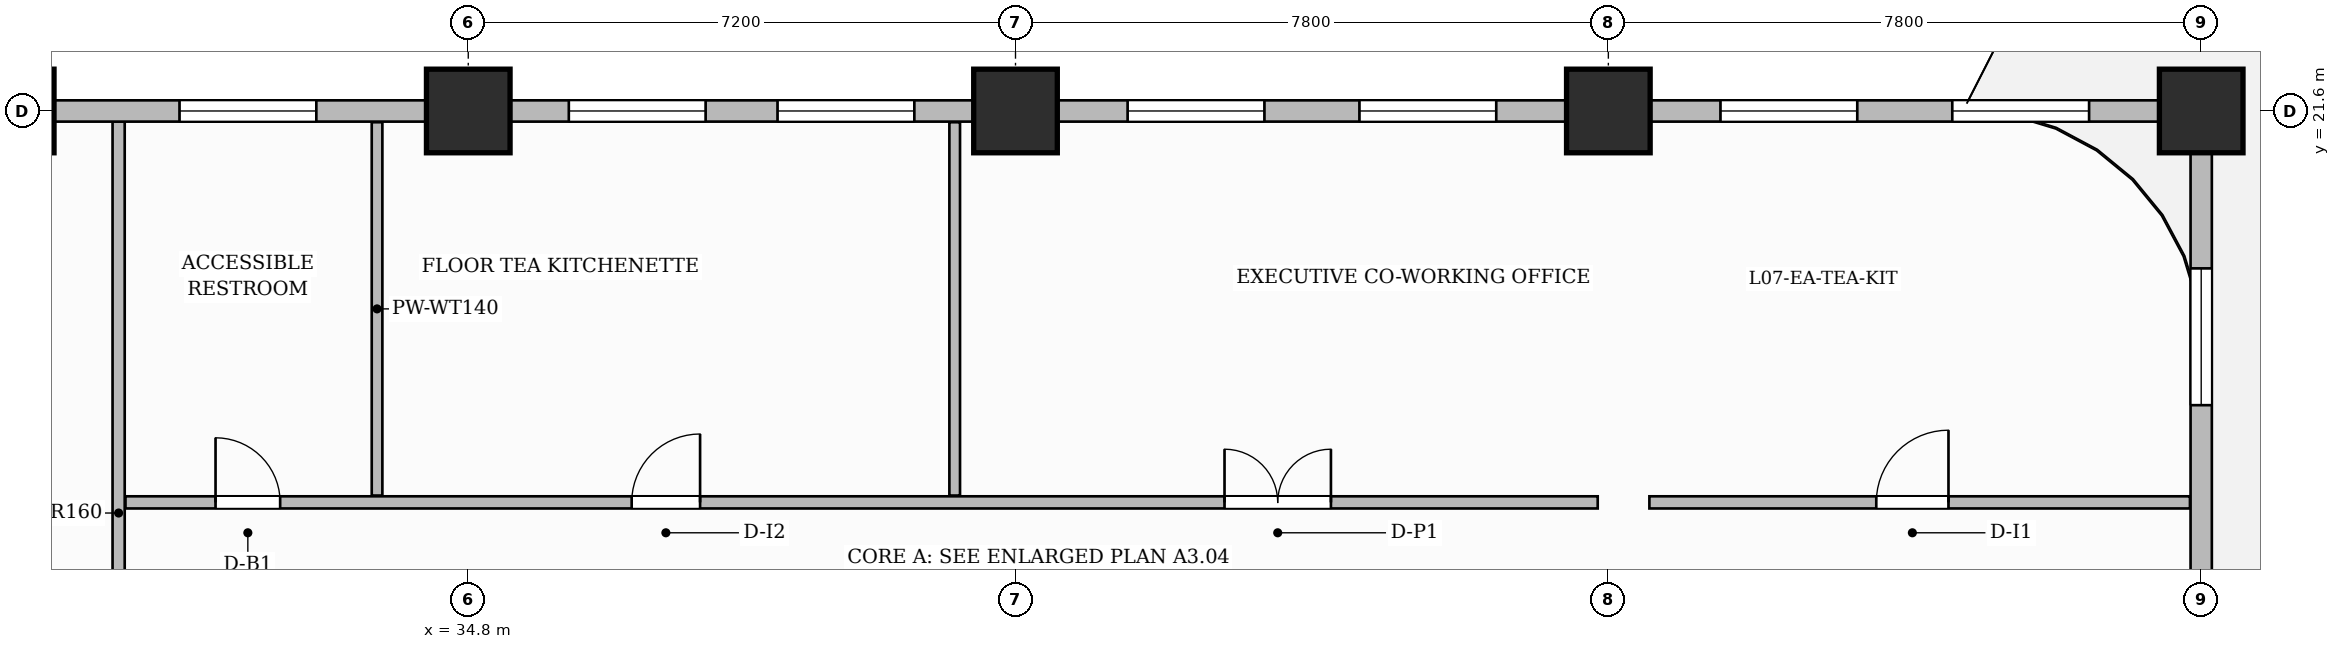
"""IFC4 building model, lengths in metres.
Left out: names, types, materials, properties, quantities, classifications, styles, units other than length and angle.
Written with IfcOpenShell. Run it as: python <this file> out.ifc"""

import sys

from ifc_helpers import new_model, si_unit, direction, frame, frame_2d, origin, origin_2d, place, context, subcontext, project, spatial, rectangle, extrude, source, transform, mapped, element, fill, save


model = new_model("IFC4")
c1 = context("Model", 3, precision=1e-05, world=origin(), true_north=direction((0.0, 1.0)))
c2 = subcontext(c1, "Body", "Model", "MODEL_VIEW")
j1 = project(units=[si_unit("LENGTHUNIT", "METRE"), si_unit("PLANEANGLEUNIT", "RADIAN")], contexts=[c1])
p1 = place(None, origin())
s1 = spatial("IfcSite", under=j1, at=p1, CompositionType="ELEMENT")
p2 = place(p1, origin())
s2 = spatial("IfcBuilding", under=s1, at=p2, CompositionType="ELEMENT")
p3 = place(p2, frame((0.0, 0.0, 36.1)))
s3 = spatial("IfcBuildingStorey", under=s2, at=p3, CompositionType="ELEMENT", Elevation=36.1)
m1 = source(origin(), c2, "Body", "SweptSolid", [
    extrude(rectangle(XDim=1.1, YDim=1.1, at=origin_2d()), origin(), (0.0, 0.0, 1.0), 3.7),
])
for number, where, z_axis, x_axis in (
    (1, (28.8, 21.6, 0.0), (0.0, 0.0, 1.0), (1.0, 0.0, 0.0)),
    (2, (34.8, 21.6, 0.0), (0.0, 0.0, 1.0), (1.0, 0.0, 0.0)),
    (3, (42.0, 21.6, 0.0), (0.0, 0.0, 1.0), (1.0, 0.0, 0.0)),
    (4, (49.8, 21.6, 0.0), (0.0, 0.0, 1.0), (1.0, 0.0, 0.0)),
    (5, (57.6, 21.6, 0.0), (0.0, 0.0, 1.0), (1.0, 0.0, 0.0)),
):
    element("IfcColumn", number, at=place(p3, frame(where, z_axis=z_axis, x_axis=x_axis)), inside=s3, PredefinedType="COLUMN", context=c2, shape_type="MappedRepresentation", body=[
        mapped(m1, transform((0.0, 0.0, 0.0), scale=1.0)),
    ])
p4 = place(p3, frame((30.2, 11.16, 0.0), z_axis=(0.0, 0.0, 1.0), x_axis=(0.0, 1.0, 0.0)))
e6 = element("IfcWall", 6, at=p4, inside=s3, PredefinedType="PARTITIONING", context=c2, shape_type="SweptSolid", body=[
    extrude(rectangle(XDim=10.3, YDim=0.16, at=frame_2d((5.15, 0.0))), origin(), (0.0, 0.0, 1.0), 3.45),
])
p5 = place(p3, frame((30.29, 16.45, 0.0), z_axis=(0.0, 0.0, 1.0), x_axis=(1.0, 0.0, 0.0)))
e7 = element("IfcWall", 7, at=p5, inside=s3, PredefinedType="PARTITIONING", context=c2, shape_type="SweptSolid", body=[
    extrude(rectangle(XDim=19.37, YDim=0.16, at=frame_2d((9.685, 0.0))), origin(), (0.0, 0.0, 1.0), 3.45),
])
p6 = place(p5, frame((1.185, 0.0, 0.0)))
e8 = element("IfcOpeningElement", 8, at=p6, cuts=e7, PredefinedType="OPENING", context=c2, shape_type="SweptSolid", body=[
    extrude(rectangle(XDim=0.85, YDim=2.1, at=frame_2d((0.425, 1.05))), frame((0.0, 0.09, 0.0), z_axis=(0.0, -1.0, 0.0), x_axis=(1.0, 0.0, 0.0)), (0.0, 0.0, 1.0), 0.18),
])
p7 = place(p5, frame((6.66, 0.0, 0.0)))
e9 = element("IfcOpeningElement", 9, at=p7, cuts=e7, PredefinedType="OPENING", context=c2, shape_type="SweptSolid", body=[
    extrude(rectangle(XDim=0.9, YDim=2.15, at=frame_2d((0.45, 1.075))), frame((0.0, 0.09, 0.0), z_axis=(0.0, -1.0, 0.0), x_axis=(1.0, 0.0, 0.0)), (0.0, 0.0, 1.0), 0.18),
])
p8 = place(p5, frame((14.46, 0.0, 0.0)))
e10 = element("IfcOpeningElement", 10, at=p8, cuts=e7, PredefinedType="OPENING", context=c2, shape_type="SweptSolid", body=[
    extrude(rectangle(XDim=1.4, YDim=2.35, at=frame_2d((0.7, 1.175))), frame((0.0, 0.09, 0.0), z_axis=(0.0, -1.0, 0.0), x_axis=(1.0, 0.0, 0.0)), (0.0, 0.0, 1.0), 0.18),
])
p9 = place(p3, frame((50.34, 16.45, 0.0), z_axis=(0.0, 0.0, 1.0), x_axis=(1.0, 0.0, 0.0)))
e11 = element("IfcWall", 11, at=p9, inside=s3, PredefinedType="PARTITIONING", context=c2, shape_type="SweptSolid", body=[
    extrude(rectangle(XDim=7.112, YDim=0.16, at=frame_2d((3.556, 0.0))), origin(), (0.0, 0.0, 1.0), 3.45),
])
p10 = place(p9, frame((2.985, 0.0, 0.0)))
e12 = element("IfcOpeningElement", 12, at=p10, cuts=e11, PredefinedType="OPENING", context=c2, shape_type="SweptSolid", body=[
    extrude(rectangle(XDim=0.95, YDim=2.15, at=frame_2d((0.475, 1.075))), frame((0.0, 0.09, 0.0), z_axis=(0.0, -1.0, 0.0), x_axis=(1.0, 0.0, 0.0)), (0.0, 0.0, 1.0), 0.18),
])
for number, where, z_axis, x_axis in (
    (13, (33.6, 16.54, 0.0), (0.0, 0.0, 1.0), (0.0, 1.0, 0.0)),
    (14, (41.2, 16.54, 0.0), (0.0, 0.0, 1.0), (0.0, 1.0, 0.0)),
):
    element("IfcWall", number, at=place(p3, frame(where, z_axis=z_axis, x_axis=x_axis)), inside=s3, PredefinedType="PARTITIONING", context=c2, shape_type="SweptSolid", body=[
        extrude(rectangle(XDim=4.912, YDim=0.14, at=frame_2d((2.456, 0.0))), origin(), (0.0, 0.0, 1.0), 3.45),
    ])
p11 = place(p3, frame((57.6, 0.05, 0.0), z_axis=(0.0, 0.0, 1.0), x_axis=(0.0, 1.0, 0.0)))
e15 = element("IfcWall", 15, at=p11, inside=s3, PredefinedType="SOLIDWALL", context=c2, shape_type="SweptSolid", body=[
    extrude(rectangle(XDim=21.5, YDim=0.28, at=frame_2d((10.75, 0.0))), origin(), (0.0, 0.0, 1.0), 2.885),
])
p12 = place(p11, frame((2.75, 0.0, 0.0)))
e16 = element("IfcOpeningElement", 16, at=p12, cuts=e15, PredefinedType="OPENING", context=c2, shape_type="SweptSolid", body=[
    extrude(rectangle(XDim=1.2, YDim=2.2, at=frame_2d((0.6, 1.1))), frame((0.0, 0.15, 0.0), z_axis=(0.0, -1.0, 0.0), x_axis=(1.0, 0.0, 0.0)), (0.0, 0.0, 1.0), 0.3),
])
p13 = place(p11, frame((1.025, 0.0, 0.8)))
e17 = element("IfcOpeningElement", 17, at=p13, cuts=e15, PredefinedType="OPENING", context=c2, shape_type="SweptSolid", body=[
    extrude(rectangle(XDim=1.15, YDim=1.8, at=frame_2d((0.575, 0.9))), frame((0.0, 0.15, 0.0), z_axis=(0.0, -1.0, 0.0), x_axis=(1.0, 0.0, 0.0)), (0.0, 0.0, 1.0), 0.3),
])
p14 = place(p11, frame((4.6, 0.0, 0.8)))
e18 = element("IfcOpeningElement", 18, at=p14, cuts=e15, PredefinedType="OPENING", context=c2, shape_type="SweptSolid", body=[
    extrude(rectangle(XDim=1.4, YDim=1.85, at=frame_2d((0.7, 0.925))), frame((0.0, 0.15, 0.0), z_axis=(0.0, -1.0, 0.0), x_axis=(1.0, 0.0, 0.0)), (0.0, 0.0, 1.0), 0.3),
])
p15 = place(p11, frame((8.475, 0.0, 0.8)))
e19 = element("IfcOpeningElement", 19, at=p15, cuts=e15, PredefinedType="OPENING", context=c2, shape_type="SweptSolid", body=[
    extrude(rectangle(XDim=1.8, YDim=1.85, at=frame_2d((0.9, 0.925))), frame((0.0, 0.15, 0.0), z_axis=(0.0, -1.0, 0.0), x_axis=(1.0, 0.0, 0.0)), (0.0, 0.0, 1.0), 0.3),
])
p16 = place(p11, frame((11.225, 0.0, 0.8)))
e20 = element("IfcOpeningElement", 20, at=p16, cuts=e15, PredefinedType="OPENING", context=c2, shape_type="SweptSolid", body=[
    extrude(rectangle(XDim=1.8, YDim=1.85, at=frame_2d((0.9, 0.925))), frame((0.0, 0.15, 0.0), z_axis=(0.0, -1.0, 0.0), x_axis=(1.0, 0.0, 0.0)), (0.0, 0.0, 1.0), 0.3),
])
p17 = place(p11, frame((17.679, 0.0, 0.8)))
e21 = element("IfcOpeningElement", 21, at=p17, cuts=e15, PredefinedType="OPENING", context=c2, shape_type="SweptSolid", body=[
    extrude(rectangle(XDim=1.8, YDim=1.85, at=frame_2d((0.9, 0.925))), frame((0.0, 0.15, 0.0), z_axis=(0.0, -1.0, 0.0), x_axis=(1.0, 0.0, 0.0)), (0.0, 0.0, 1.0), 0.3),
])
p18 = place(p3, frame((14.4, 21.6, 0.0), z_axis=(0.0, 0.0, 1.0), x_axis=(1.0, 0.0, 0.0)))
e22 = element("IfcWall", 22, at=p18, inside=s3, PredefinedType="SOLIDWALL", context=c2, shape_type="SweptSolid", body=[
    extrude(rectangle(XDim=43.2, YDim=0.28, at=frame_2d((21.6, 0.0))), origin(), (0.0, 0.0, 1.0), 2.885),
])
p19 = place(p18, frame((1.5, 0.0, 0.0)))
e23 = element("IfcOpeningElement", 23, at=p19, cuts=e22, PredefinedType="OPENING", context=c2, shape_type="SweptSolid", body=[
    extrude(rectangle(XDim=1.2, YDim=2.2, at=frame_2d((0.6, 1.1))), frame((0.0, 0.15, 0.0), z_axis=(0.0, -1.0, 0.0), x_axis=(1.0, 0.0, 0.0)), (0.0, 0.0, 1.0), 0.3),
])
p20 = place(p18, frame((3.336, 0.0, 0.8)))
e24 = element("IfcOpeningElement", 24, at=p20, cuts=e22, PredefinedType="OPENING", context=c2, shape_type="SweptSolid", body=[
    extrude(rectangle(XDim=1.4, YDim=1.85, at=frame_2d((0.7, 0.925))), frame((0.0, 0.15, 0.0), z_axis=(0.0, -1.0, 0.0), x_axis=(1.0, 0.0, 0.0)), (0.0, 0.0, 1.0), 0.3),
])
p21 = place(p18, frame((5.269, 0.0, 0.8)))
e25 = element("IfcOpeningElement", 25, at=p21, cuts=e22, PredefinedType="OPENING", context=c2, shape_type="SweptSolid", body=[
    extrude(rectangle(XDim=0.95, YDim=1.75, at=frame_2d((0.475, 0.875))), frame((0.0, 0.15, 0.0), z_axis=(0.0, -1.0, 0.0), x_axis=(1.0, 0.0, 0.0)), (0.0, 0.0, 1.0), 0.3),
])
p22 = place(p18, frame((8.525, 0.0, 0.8)))
e26 = element("IfcOpeningElement", 26, at=p22, cuts=e22, PredefinedType="OPENING", context=c2, shape_type="SweptSolid", body=[
    extrude(rectangle(XDim=1.8, YDim=1.85, at=frame_2d((0.9, 0.925))), frame((0.0, 0.15, 0.0), z_axis=(0.0, -1.0, 0.0), x_axis=(1.0, 0.0, 0.0)), (0.0, 0.0, 1.0), 0.3),
])
p23 = place(p18, frame((11.275, 0.0, 0.8)))
e27 = element("IfcOpeningElement", 27, at=p23, cuts=e22, PredefinedType="OPENING", context=c2, shape_type="SweptSolid", body=[
    extrude(rectangle(XDim=1.8, YDim=1.85, at=frame_2d((0.9, 0.925))), frame((0.0, 0.15, 0.0), z_axis=(0.0, -1.0, 0.0), x_axis=(1.0, 0.0, 0.0)), (0.0, 0.0, 1.0), 0.3),
])
p24 = place(p18, frame((16.601, 0.0, 0.8)))
e28 = element("IfcOpeningElement", 28, at=p24, cuts=e22, PredefinedType="OPENING", context=c2, shape_type="SweptSolid", body=[
    extrude(rectangle(XDim=1.8, YDim=1.85, at=frame_2d((0.9, 0.925))), frame((0.0, 0.15, 0.0), z_axis=(0.0, -1.0, 0.0), x_axis=(1.0, 0.0, 0.0)), (0.0, 0.0, 1.0), 0.3),
])
p25 = place(p18, frame((21.723, 0.0, 0.8)))
e29 = element("IfcOpeningElement", 29, at=p25, cuts=e22, PredefinedType="OPENING", context=c2, shape_type="SweptSolid", body=[
    extrude(rectangle(XDim=1.8, YDim=1.85, at=frame_2d((0.9, 0.925))), frame((0.0, 0.15, 0.0), z_axis=(0.0, -1.0, 0.0), x_axis=(1.0, 0.0, 0.0)), (0.0, 0.0, 1.0), 0.3),
])
p26 = place(p18, frame((24.469, 0.0, 0.8)))
e30 = element("IfcOpeningElement", 30, at=p26, cuts=e22, PredefinedType="OPENING", context=c2, shape_type="SweptSolid", body=[
    extrude(rectangle(XDim=1.8, YDim=1.85, at=frame_2d((0.9, 0.925))), frame((0.0, 0.15, 0.0), z_axis=(0.0, -1.0, 0.0), x_axis=(1.0, 0.0, 0.0)), (0.0, 0.0, 1.0), 0.3),
])
p27 = place(p18, frame((29.075, 0.0, 0.8)))
e31 = element("IfcOpeningElement", 31, at=p27, cuts=e22, PredefinedType="OPENING", context=c2, shape_type="SweptSolid", body=[
    extrude(rectangle(XDim=1.8, YDim=1.85, at=frame_2d((0.9, 0.925))), frame((0.0, 0.15, 0.0), z_axis=(0.0, -1.0, 0.0), x_axis=(1.0, 0.0, 0.0)), (0.0, 0.0, 1.0), 0.3),
])
p28 = place(p18, frame((32.125, 0.0, 0.8)))
e32 = element("IfcOpeningElement", 32, at=p28, cuts=e22, PredefinedType="OPENING", context=c2, shape_type="SweptSolid", body=[
    extrude(rectangle(XDim=1.8, YDim=1.85, at=frame_2d((0.9, 0.925))), frame((0.0, 0.15, 0.0), z_axis=(0.0, -1.0, 0.0), x_axis=(1.0, 0.0, 0.0)), (0.0, 0.0, 1.0), 0.3),
])
p29 = place(p18, frame((36.875, 0.0, 0.8)))
e33 = element("IfcOpeningElement", 33, at=p29, cuts=e22, PredefinedType="OPENING", context=c2, shape_type="SweptSolid", body=[
    extrude(rectangle(XDim=1.8, YDim=1.85, at=frame_2d((0.9, 0.925))), frame((0.0, 0.15, 0.0), z_axis=(0.0, -1.0, 0.0), x_axis=(1.0, 0.0, 0.0)), (0.0, 0.0, 1.0), 0.3),
])
p30 = place(p18, frame((39.925, 0.0, 0.8)))
e34 = element("IfcOpeningElement", 34, at=p30, cuts=e22, PredefinedType="OPENING", context=c2, shape_type="SweptSolid", body=[
    extrude(rectangle(XDim=1.8, YDim=1.85, at=frame_2d((0.9, 0.925))), frame((0.0, 0.15, 0.0), z_axis=(0.0, -1.0, 0.0), x_axis=(1.0, 0.0, 0.0)), (0.0, 0.0, 1.0), 0.3),
])
m2 = source(origin(), c2, "Body", "SweptSolid", [
    extrude(rectangle(XDim=0.95, YDim=2.15, at=frame_2d((0.475, 1.075))), frame((0.0, 0.025, 0.0), z_axis=(0.0, -1.0, 0.0), x_axis=(1.0, 0.0, 0.0)), (0.0, 0.0, 1.0), 0.05),
])
p31 = place(p10, origin())
e35 = element("IfcDoor", 35, at=p31, inside=s3, OperationType="SINGLE_SWING_RIGHT", PredefinedType="DOOR", context=c2, shape_type="MappedRepresentation", body=[
    mapped(m2, transform((0.0, 0.0, 0.0), scale=1.0)),
])
fill(e12, e35)
m3 = source(origin(), c2, "Body", "SweptSolid", [
    extrude(rectangle(XDim=0.85, YDim=2.1, at=frame_2d((0.425, 1.05))), frame((0.0, 0.025, 0.0), z_axis=(0.0, -1.0, 0.0), x_axis=(1.0, 0.0, 0.0)), (0.0, 0.0, 1.0), 0.05),
])
p32 = place(p6, origin())
e36 = element("IfcDoor", 36, at=p32, inside=s3, OperationType="SINGLE_SWING_LEFT", PredefinedType="DOOR", context=c2, shape_type="MappedRepresentation", body=[
    mapped(m3, transform((0.0, 0.0, 0.0), scale=1.0)),
])
fill(e8, e36)
m4 = source(origin(), c2, "Body", "SweptSolid", [
    extrude(rectangle(XDim=0.9, YDim=2.15, at=frame_2d((0.45, 1.075))), frame((0.0, 0.025, 0.0), z_axis=(0.0, -1.0, 0.0), x_axis=(1.0, 0.0, 0.0)), (0.0, 0.0, 1.0), 0.05),
])
p33 = place(p7, origin())
e37 = element("IfcDoor", 37, at=p33, inside=s3, OperationType="SINGLE_SWING_RIGHT", PredefinedType="DOOR", context=c2, shape_type="MappedRepresentation", body=[
    mapped(m4, transform((0.0, 0.0, 0.0), scale=1.0)),
])
fill(e9, e37)
m5 = source(origin(), c2, "Body", "SweptSolid", [
    extrude(rectangle(XDim=1.4, YDim=2.35, at=frame_2d((0.7, 1.175))), frame((0.0, 0.025, 0.0), z_axis=(0.0, -1.0, 0.0), x_axis=(1.0, 0.0, 0.0)), (0.0, 0.0, 1.0), 0.05),
])
p34 = place(p8, origin())
e38 = element("IfcDoor", 38, at=p34, inside=s3, OperationType="DOUBLE_DOOR_SINGLE_SWING", PredefinedType="DOOR", context=c2, shape_type="MappedRepresentation", body=[
    mapped(m5, transform((0.0, 0.0, 0.0), scale=1.0)),
])
fill(e10, e38)
m6 = source(origin(), c2, "Body", "SweptSolid", [
    extrude(rectangle(XDim=1.8, YDim=1.85, at=frame_2d((0.9, 0.925))), frame((0.0, 0.03, 0.0), z_axis=(0.0, -1.0, 0.0), x_axis=(1.0, 0.0, 0.0)), (0.0, 0.0, 1.0), 0.06),
])
p35 = place(p17, origin())
e39 = element("IfcWindow", 39, at=p35, inside=s3, PartitioningType="DOUBLE_PANEL_VERTICAL", PredefinedType="WINDOW", context=c2, shape_type="MappedRepresentation", body=[
    mapped(m6, transform((0.0, 0.0, 0.0), scale=1.0)),
])
fill(e21, e39)
p36 = place(p24, origin())
e40 = element("IfcWindow", 40, at=p36, inside=s3, PartitioningType="DOUBLE_PANEL_VERTICAL", PredefinedType="WINDOW", context=c2, shape_type="MappedRepresentation", body=[
    mapped(m6, transform((0.0, 0.0, 0.0), scale=1.0)),
])
fill(e28, e40)
p37 = place(p25, origin())
e41 = element("IfcWindow", 41, at=p37, inside=s3, PartitioningType="DOUBLE_PANEL_VERTICAL", PredefinedType="WINDOW", context=c2, shape_type="MappedRepresentation", body=[
    mapped(m6, transform((0.0, 0.0, 0.0), scale=1.0)),
])
fill(e29, e41)
p38 = place(p26, origin())
e42 = element("IfcWindow", 42, at=p38, inside=s3, PartitioningType="DOUBLE_PANEL_VERTICAL", PredefinedType="WINDOW", context=c2, shape_type="MappedRepresentation", body=[
    mapped(m6, transform((0.0, 0.0, 0.0), scale=1.0)),
])
fill(e30, e42)
p39 = place(p27, origin())
e43 = element("IfcWindow", 43, at=p39, inside=s3, PartitioningType="DOUBLE_PANEL_VERTICAL", PredefinedType="WINDOW", context=c2, shape_type="MappedRepresentation", body=[
    mapped(m6, transform((0.0, 0.0, 0.0), scale=1.0)),
])
fill(e31, e43)
p40 = place(p28, origin())
e44 = element("IfcWindow", 44, at=p40, inside=s3, PartitioningType="DOUBLE_PANEL_VERTICAL", PredefinedType="WINDOW", context=c2, shape_type="MappedRepresentation", body=[
    mapped(m6, transform((0.0, 0.0, 0.0), scale=1.0)),
])
fill(e32, e44)
p41 = place(p29, origin())
e45 = element("IfcWindow", 45, at=p41, inside=s3, PartitioningType="DOUBLE_PANEL_VERTICAL", PredefinedType="WINDOW", context=c2, shape_type="MappedRepresentation", body=[
    mapped(m6, transform((0.0, 0.0, 0.0), scale=1.0)),
])
fill(e33, e45)
p42 = place(p30, origin())
e46 = element("IfcWindow", 46, at=p42, inside=s3, PartitioningType="DOUBLE_PANEL_VERTICAL", PredefinedType="WINDOW", context=c2, shape_type="MappedRepresentation", body=[
    mapped(m6, transform((0.0, 0.0, 0.0), scale=1.0)),
])
fill(e34, e46)
save(model, sys.argv[1])
